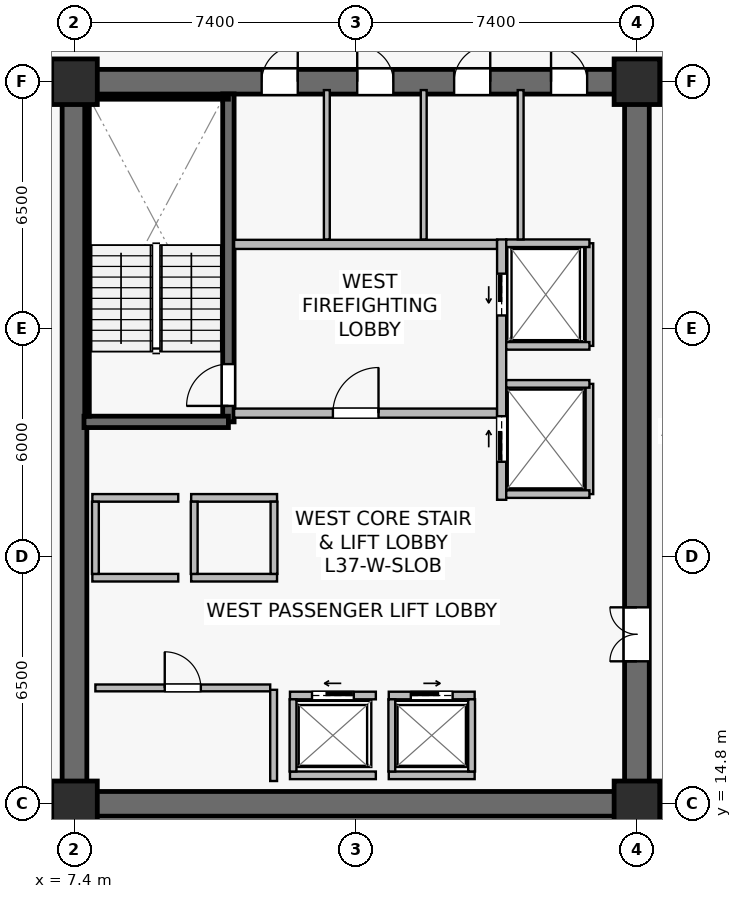
"""IFC4 building model, lengths in metres.
Left out: names, types, materials, properties, quantities, classifications, styles, units other than length and angle.
Written with IfcOpenShell. Run it as: python <this file> out.ifc"""

import sys

from ifc_helpers import new_model, si_unit, direction, frame, frame_2d, origin, origin_2d, place, context, subcontext, project, spatial, rectangle, extrude, source, transform, mapped, element, fill, save


model = new_model("IFC4")
c1 = context("Model", 3, precision=1e-05, world=origin(), true_north=direction((0.0, 1.0)))
c2 = subcontext(c1, "Body", "Model", "MODEL_VIEW")
j1 = project(units=[si_unit("LENGTHUNIT", "METRE"), si_unit("PLANEANGLEUNIT", "RADIAN")], contexts=[c1])
p1 = place(None, origin())
s1 = spatial("IfcSite", under=j1, at=p1, CompositionType="ELEMENT")
p2 = place(p1, origin())
s2 = spatial("IfcBuilding", under=s1, at=p2, CompositionType="ELEMENT")
p3 = place(p2, frame((0.0, 0.0, 154.3)))
s3 = spatial("IfcBuildingStorey", under=s2, at=p3, CompositionType="ELEMENT", Elevation=154.3)
p4 = place(p3, frame((7.075, 14.8, 0.0), z_axis=(0.0, 0.0, 1.0), x_axis=(1.0, 0.0, 0.0)))
e1 = element("IfcWall", 1, at=p4, inside=s3, PredefinedType="SHEAR", context=c2, shape_type="SweptSolid", body=[
    extrude(rectangle(XDim=15.45, YDim=0.65, at=frame_2d((7.725, 0.0))), origin(), (0.0, 0.0, 1.0), 3.79),
])
p5 = place(p3, frame((7.075, 33.8, 0.0), z_axis=(0.0, 0.0, 1.0), x_axis=(1.0, 0.0, 0.0)))
e2 = element("IfcWall", 2, at=p5, inside=s3, PredefinedType="SHEAR", context=c2, shape_type="SweptSolid", body=[
    extrude(rectangle(XDim=15.45, YDim=0.65, at=frame_2d((7.725, 0.0))), origin(), (0.0, 0.0, 1.0), 3.79),
])
p6 = place(p5, frame((5.25, 0.0, 0.0)))
e3 = element("IfcOpeningElement", 3, at=p6, cuts=e2, PredefinedType="OPENING", context=c2, shape_type="SweptSolid", body=[
    extrude(rectangle(XDim=0.95, YDim=2.15, at=frame_2d((0.475, 1.075))), frame((0.0, 0.335, 0.0), z_axis=(0.0, -1.0, 0.0), x_axis=(1.0, 0.0, 0.0)), (0.0, 0.0, 1.0), 0.67),
])
p7 = place(p5, frame((7.765, 0.0, 0.0)))
e4 = element("IfcOpeningElement", 4, at=p7, cuts=e2, PredefinedType="OPENING", context=c2, shape_type="SweptSolid", body=[
    extrude(rectangle(XDim=0.95, YDim=2.15, at=frame_2d((0.475, 1.075))), frame((0.0, 0.335, 0.0), z_axis=(0.0, -1.0, 0.0), x_axis=(1.0, 0.0, 0.0)), (0.0, 0.0, 1.0), 0.67),
])
p8 = place(p5, frame((10.315, 0.0, 0.0)))
e5 = element("IfcOpeningElement", 5, at=p8, cuts=e2, PredefinedType="OPENING", context=c2, shape_type="SweptSolid", body=[
    extrude(rectangle(XDim=0.95, YDim=2.15, at=frame_2d((0.475, 1.075))), frame((0.0, 0.335, 0.0), z_axis=(0.0, -1.0, 0.0), x_axis=(1.0, 0.0, 0.0)), (0.0, 0.0, 1.0), 0.67),
])
p9 = place(p5, frame((12.865, 0.0, 0.0)))
e6 = element("IfcOpeningElement", 6, at=p9, cuts=e2, PredefinedType="OPENING", context=c2, shape_type="SweptSolid", body=[
    extrude(rectangle(XDim=0.95, YDim=2.15, at=frame_2d((0.475, 1.075))), frame((0.0, 0.335, 0.0), z_axis=(0.0, -1.0, 0.0), x_axis=(1.0, 0.0, 0.0)), (0.0, 0.0, 1.0), 0.67),
])
p10 = place(p3, frame((7.4, 15.125, 0.0), z_axis=(0.0, 0.0, 1.0), x_axis=(0.0, 1.0, 0.0)))
e7 = element("IfcWall", 7, at=p10, inside=s3, PredefinedType="SHEAR", context=c2, shape_type="SweptSolid", body=[
    extrude(rectangle(XDim=18.35, YDim=0.65, at=frame_2d((9.175, 0.0))), origin(), (0.0, 0.0, 1.0), 3.79),
])
p11 = place(p3, frame((22.2, 15.125, 0.0), z_axis=(0.0, 0.0, 1.0), x_axis=(0.0, 1.0, 0.0)))
e8 = element("IfcWall", 8, at=p11, inside=s3, PredefinedType="SHEAR", context=c2, shape_type="SweptSolid", body=[
    extrude(rectangle(XDim=18.35, YDim=0.65, at=frame_2d((9.175, 0.0))), origin(), (0.0, 0.0, 1.0), 3.79),
])
p12 = place(p11, frame((3.425, 0.0, 0.0)))
e9 = element("IfcOpeningElement", 9, at=p12, cuts=e8, PredefinedType="OPENING", context=c2, shape_type="SweptSolid", body=[
    extrude(rectangle(XDim=1.42, YDim=2.2, at=frame_2d((0.71, 1.1))), frame((0.0, 0.335, 0.0), z_axis=(0.0, -1.0, 0.0), x_axis=(1.0, 0.0, 0.0)), (0.0, 0.0, 1.0), 0.67),
])
p13 = place(p3, frame((11.45, 24.85, 0.0), z_axis=(0.0, 0.0, 1.0), x_axis=(0.0, 1.0, 0.0)))
e10 = element("IfcWall", 10, at=p13, inside=s3, PredefinedType="SHEAR", context=c2, shape_type="SweptSolid", body=[
    extrude(rectangle(XDim=8.63, YDim=0.3, at=frame_2d((4.315, 0.0))), origin(), (0.0, 0.0, 1.0), 3.79),
])
p14 = place(p13, frame((0.42, 0.0, 0.0)))
e11 = element("IfcOpeningElement", 11, at=p14, cuts=e10, PredefinedType="OPENING", context=c2, shape_type="SweptSolid", body=[
    extrude(rectangle(XDim=1.1, YDim=2.15, at=frame_2d((0.55, 1.075))), frame((0.0, 0.16, 0.0), z_axis=(0.0, -1.0, 0.0), x_axis=(1.0, 0.0, 0.0)), (0.0, 0.0, 1.0), 0.32),
])
p15 = place(p3, frame((7.65, 24.85, 0.0), z_axis=(0.0, 0.0, 1.0), x_axis=(1.0, 0.0, 0.0)))
e12 = element("IfcWall", 12, at=p15, inside=s3, PredefinedType="SHEAR", context=c2, shape_type="SweptSolid", body=[
    extrude(rectangle(XDim=3.8, YDim=0.3, at=frame_2d((1.9, 0.0))), origin(), (0.0, 0.0, 1.0), 3.79),
])
p16 = place(p3, frame((7.73, 33.4, 0.0), z_axis=(0.0, 0.0, 1.0), x_axis=(1.0, 0.0, 0.0)))
e13 = element("IfcWall", 13, at=p16, inside=s3, PredefinedType="SOLIDWALL", context=c2, shape_type="SweptSolid", body=[
    extrude(rectangle(XDim=3.72, YDim=0.12, at=frame_2d((1.86, 0.0))), origin(), (0.0, 0.0, 1.0), 3.79),
])
p17 = place(p3, frame((7.73, 25.0, 0.0), z_axis=(0.0, 0.0, 1.0), x_axis=(0.0, 1.0, 0.0)))
e14 = element("IfcWall", 14, at=p17, inside=s3, PredefinedType="SOLIDWALL", context=c2, shape_type="SweptSolid", body=[
    extrude(rectangle(XDim=8.32, YDim=0.12, at=frame_2d((4.16, 0.0))), origin(), (0.0, 0.0, 1.0), 3.79),
])
m1 = source(origin(), c2, "Body", "SweptSolid", [
    extrude(rectangle(XDim=1.2, YDim=1.2, at=origin_2d()), origin(), (0.0, 0.0, 1.0), 4.1),
])
for number, where, z_axis, x_axis in (
    (15, (7.4, 14.8, 0.0), (0.0, 0.0, 1.0), (1.0, 0.0, 0.0)),
    (16, (22.2, 14.8, 0.0), (0.0, 0.0, 1.0), (1.0, 0.0, 0.0)),
    (17, (7.4, 33.8, 0.0), (0.0, 0.0, 1.0), (1.0, 0.0, 0.0)),
    (18, (22.2, 33.8, 0.0), (0.0, 0.0, 1.0), (1.0, 0.0, 0.0)),
):
    element("IfcColumn", number, at=place(p3, frame(where, z_axis=z_axis, x_axis=x_axis)), inside=s3, PredefinedType="COLUMN", context=c2, shape_type="MappedRepresentation", body=[
        mapped(m1, transform((0.0, 0.0, 0.0), scale=1.0)),
    ])
p18 = place(p3, frame((11.6, 25.08, 0.0), z_axis=(0.0, 0.0, 1.0), x_axis=(1.0, 0.0, 0.0)))
e19 = element("IfcWall", 19, at=p18, inside=s3, PredefinedType="SOLIDWALL", context=c2, shape_type="SweptSolid", body=[
    extrude(rectangle(XDim=6.92, YDim=0.24, at=frame_2d((3.46, 0.0))), origin(), (0.0, 0.0, 1.0), 3.187),
])
p19 = place(p18, frame((2.6, 0.0, 0.0)))
e20 = element("IfcOpeningElement", 20, at=p19, cuts=e19, PredefinedType="OPENING", context=c2, shape_type="SweptSolid", body=[
    extrude(rectangle(XDim=1.2, YDim=2.16, at=frame_2d((0.6, 1.08))), frame((0.0, 0.13, 0.0), z_axis=(0.0, -1.0, 0.0), x_axis=(1.0, 0.0, 0.0)), (0.0, 0.0, 1.0), 0.26),
])
p20 = place(p3, frame((11.6, 29.52, 0.0), z_axis=(0.0, 0.0, 1.0), x_axis=(1.0, 0.0, 0.0)))
e21 = element("IfcWall", 21, at=p20, inside=s3, PredefinedType="SOLIDWALL", context=c2, shape_type="SweptSolid", body=[
    extrude(rectangle(XDim=6.92, YDim=0.24, at=frame_2d((3.46, 0.0))), origin(), (0.0, 0.0, 1.0), 3.187),
])
p21 = place(p3, frame((18.64, 22.8, 0.0), z_axis=(0.0, 0.0, 1.0), x_axis=(0.0, 1.0, 0.0)))
e22 = element("IfcWall", 22, at=p21, inside=s3, PredefinedType="SOLIDWALL", context=c2, shape_type="SweptSolid", body=[
    extrude(rectangle(XDim=6.85, YDim=0.24, at=frame_2d((3.425, 0.0))), origin(), (0.0, 0.0, 1.0), 2.875),
])
p22 = place(p21, frame((4.85, 0.0, 0.0)))
e23 = element("IfcOpeningElement", 23, at=p22, cuts=e22, PredefinedType="OPENING", context=c2, shape_type="SweptSolid", body=[
    extrude(rectangle(XDim=1.1, YDim=2.22, at=frame_2d((0.55, 1.11))), frame((0.0, 0.13, 0.0), z_axis=(0.0, -1.0, 0.0), x_axis=(1.0, 0.0, 0.0)), (0.0, 0.0, 1.0), 0.26),
])
p23 = place(p21, frame((1.0, 0.0, 0.0)))
e24 = element("IfcOpeningElement", 24, at=p23, cuts=e22, PredefinedType="OPENING", context=c2, shape_type="SweptSolid", body=[
    extrude(rectangle(XDim=1.2, YDim=2.22, at=frame_2d((0.6, 1.11))), frame((0.0, 0.13, 0.0), z_axis=(0.0, -1.0, 0.0), x_axis=(1.0, 0.0, 0.0)), (0.0, 0.0, 1.0), 0.26),
])
p24 = place(p3, frame((13.07, 17.65, 0.0), z_axis=(0.0, 0.0, 1.0), x_axis=(1.0, 0.0, 0.0)))
e25 = element("IfcWall", 25, at=p24, inside=s3, PredefinedType="SOLIDWALL", context=c2, shape_type="SweptSolid", body=[
    extrude(rectangle(XDim=2.26, YDim=0.2, at=frame_2d((1.13, 0.0))), origin(), (0.0, 0.0, 1.0), 3.187),
])
p25 = place(p24, frame((0.58, 0.0, 0.0)))
e26 = element("IfcOpeningElement", 26, at=p25, cuts=e25, PredefinedType="OPENING", context=c2, shape_type="SweptSolid", body=[
    extrude(rectangle(XDim=1.1, YDim=2.22, at=frame_2d((0.55, 1.11))), frame((0.0, 0.11, 0.0), z_axis=(0.0, -1.0, 0.0), x_axis=(1.0, 0.0, 0.0)), (0.0, 0.0, 1.0), 0.22),
])
p26 = place(p3, frame((13.07, 15.55, 0.0), z_axis=(0.0, 0.0, 1.0), x_axis=(1.0, 0.0, 0.0)))
e27 = element("IfcWall", 27, at=p26, inside=s3, PredefinedType="SOLIDWALL", context=c2, shape_type="SweptSolid", body=[
    extrude(rectangle(XDim=2.26, YDim=0.2, at=frame_2d((1.13, 0.0))), origin(), (0.0, 0.0, 1.0), 3.187),
])
p27 = place(p3, frame((13.15, 15.65, 0.0), z_axis=(0.0, 0.0, 1.0), x_axis=(0.0, 1.0, 0.0)))
e28 = element("IfcWall", 28, at=p27, inside=s3, PredefinedType="SOLIDWALL", context=c2, shape_type="SweptSolid", body=[
    extrude(rectangle(XDim=1.9, YDim=0.18, at=frame_2d((0.95, 0.0))), origin(), (0.0, 0.0, 1.0), 3.79),
])
p28 = place(p3, frame((15.67, 17.65, 0.0), z_axis=(0.0, 0.0, 1.0), x_axis=(1.0, 0.0, 0.0)))
e29 = element("IfcWall", 29, at=p28, inside=s3, PredefinedType="SOLIDWALL", context=c2, shape_type="SweptSolid", body=[
    extrude(rectangle(XDim=2.26, YDim=0.2, at=frame_2d((1.13, 0.0))), origin(), (0.0, 0.0, 1.0), 3.79),
])
p29 = place(p28, frame((0.58, 0.0, 0.0)))
e30 = element("IfcOpeningElement", 30, at=p29, cuts=e29, PredefinedType="OPENING", context=c2, shape_type="SweptSolid", body=[
    extrude(rectangle(XDim=1.1, YDim=2.22, at=frame_2d((0.55, 1.11))), frame((0.0, 0.11, 0.0), z_axis=(0.0, -1.0, 0.0), x_axis=(1.0, 0.0, 0.0)), (0.0, 0.0, 1.0), 0.22),
])
p30 = place(p3, frame((15.67, 15.55, 0.0), z_axis=(0.0, 0.0, 1.0), x_axis=(1.0, 0.0, 0.0)))
e31 = element("IfcWall", 31, at=p30, inside=s3, PredefinedType="SOLIDWALL", context=c2, shape_type="SweptSolid", body=[
    extrude(rectangle(XDim=2.26, YDim=0.2, at=frame_2d((1.13, 0.0))), origin(), (0.0, 0.0, 1.0), 3.79),
])
for number, where, z_axis, x_axis in (
    (32, (15.75, 15.65, 0.0), (0.0, 0.0, 1.0), (0.0, 1.0, 0.0)),
    (33, (17.85, 15.65, 0.0), (0.0, 0.0, 1.0), (0.0, 1.0, 0.0)),
):
    element("IfcWall", number, at=place(p3, frame(where, z_axis=z_axis, x_axis=x_axis)), inside=s3, PredefinedType="SOLIDWALL", context=c2, shape_type="SweptSolid", body=[
        extrude(rectangle(XDim=1.9, YDim=0.18, at=frame_2d((0.95, 0.0))), origin(), (0.0, 0.0, 1.0), 3.79),
    ])
for number, where, z_axis, x_axis in (
    (34, (7.87, 20.75, 0.0), (0.0, 0.0, 1.0), (1.0, 0.0, 0.0)),
    (35, (7.87, 22.85, 0.0), (0.0, 0.0, 1.0), (1.0, 0.0, 0.0)),
):
    element("IfcWall", number, at=place(p3, frame(where, z_axis=z_axis, x_axis=x_axis)), inside=s3, PredefinedType="SOLIDWALL", context=c2, shape_type="SweptSolid", body=[
        extrude(rectangle(XDim=2.26, YDim=0.2, at=frame_2d((1.13, 0.0))), origin(), (0.0, 0.0, 1.0), 3.79),
    ])
p31 = place(p3, frame((7.95, 20.85, 0.0), z_axis=(0.0, 0.0, 1.0), x_axis=(0.0, 1.0, 0.0)))
e36 = element("IfcWall", 36, at=p31, inside=s3, PredefinedType="SOLIDWALL", context=c2, shape_type="SweptSolid", body=[
    extrude(rectangle(XDim=1.9, YDim=0.18, at=frame_2d((0.95, 0.0))), origin(), (0.0, 0.0, 1.0), 3.79),
])
for number, where, z_axis, x_axis in (
    (37, (10.47, 20.75, 0.0), (0.0, 0.0, 1.0), (1.0, 0.0, 0.0)),
    (38, (10.47, 22.85, 0.0), (0.0, 0.0, 1.0), (1.0, 0.0, 0.0)),
):
    element("IfcWall", number, at=place(p3, frame(where, z_axis=z_axis, x_axis=x_axis)), inside=s3, PredefinedType="SOLIDWALL", context=c2, shape_type="SweptSolid", body=[
        extrude(rectangle(XDim=2.26, YDim=0.2, at=frame_2d((1.13, 0.0))), origin(), (0.0, 0.0, 1.0), 3.79),
    ])
for number, where, z_axis, x_axis in (
    (39, (10.55, 20.85, 0.0), (0.0, 0.0, 1.0), (0.0, 1.0, 0.0)),
    (40, (12.65, 20.85, 0.0), (0.0, 0.0, 1.0), (0.0, 1.0, 0.0)),
):
    element("IfcWall", number, at=place(p3, frame(where, z_axis=z_axis, x_axis=x_axis)), inside=s3, PredefinedType="SOLIDWALL", context=c2, shape_type="SweptSolid", body=[
        extrude(rectangle(XDim=1.9, YDim=0.18, at=frame_2d((0.95, 0.0))), origin(), (0.0, 0.0, 1.0), 3.79),
    ])
p32 = place(p3, frame((20.95, 26.85, 0.0), z_axis=(0.0, 0.0, 1.0), x_axis=(0.0, 1.0, 0.0)))
e41 = element("IfcWall", 41, at=p32, inside=s3, PredefinedType="SOLIDWALL", context=c2, shape_type="SweptSolid", body=[
    extrude(rectangle(XDim=2.7, YDim=0.2, at=frame_2d((1.35, 0.0))), origin(), (0.0, 0.0, 1.0), 3.79),
])
p33 = place(p3, frame((18.76, 29.55, 0.0), z_axis=(0.0, 0.0, 1.0), x_axis=(1.0, 0.0, 0.0)))
e42 = element("IfcWall", 42, at=p33, inside=s3, PredefinedType="SOLIDWALL", context=c2, shape_type="SweptSolid", body=[
    extrude(rectangle(XDim=2.19, YDim=0.2, at=frame_2d((1.095, 0.0))), origin(), (0.0, 0.0, 1.0), 3.79),
])
p34 = place(p3, frame((18.76, 26.85, 0.0), z_axis=(0.0, 0.0, 1.0), x_axis=(1.0, 0.0, 0.0)))
e43 = element("IfcWall", 43, at=p34, inside=s3, PredefinedType="SOLIDWALL", context=c2, shape_type="SweptSolid", body=[
    extrude(rectangle(XDim=2.19, YDim=0.2, at=frame_2d((1.095, 0.0))), origin(), (0.0, 0.0, 1.0), 3.187),
])
p35 = place(p3, frame((20.95, 22.95, 0.0), z_axis=(0.0, 0.0, 1.0), x_axis=(0.0, 1.0, 0.0)))
e44 = element("IfcWall", 44, at=p35, inside=s3, PredefinedType="SOLIDWALL", context=c2, shape_type="SweptSolid", body=[
    extrude(rectangle(XDim=2.9, YDim=0.2, at=frame_2d((1.45, 0.0))), origin(), (0.0, 0.0, 1.0), 2.875),
])
for number, where, z_axis, x_axis in (
    (45, (18.76, 25.85, 0.0), (0.0, 0.0, 1.0), (1.0, 0.0, 0.0)),
    (46, (18.76, 22.95, 0.0), (0.0, 0.0, 1.0), (1.0, 0.0, 0.0)),
):
    element("IfcWall", number, at=place(p3, frame(where, z_axis=z_axis, x_axis=x_axis)), inside=s3, PredefinedType="SOLIDWALL", context=c2, shape_type="SweptSolid", body=[
        extrude(rectangle(XDim=2.19, YDim=0.2, at=frame_2d((1.095, 0.0))), origin(), (0.0, 0.0, 1.0), 3.79),
    ])
p36 = place(p3, frame((7.95, 17.85, 0.0), z_axis=(0.0, 0.0, 1.0), x_axis=(1.0, 0.0, 0.0)))
e47 = element("IfcWall", 47, at=p36, inside=s3, PredefinedType="SOLIDWALL", context=c2, shape_type="SweptSolid", body=[
    extrude(rectangle(XDim=4.6, YDim=0.18, at=frame_2d((2.3, 0.0))), origin(), (0.0, 0.0, 1.0), 3.79),
])
p37 = place(p36, frame((1.825, 0.0, 0.0)))
e48 = element("IfcOpeningElement", 48, at=p37, cuts=e47, PredefinedType="OPENING", context=c2, shape_type="SweptSolid", body=[
    extrude(rectangle(XDim=0.95, YDim=2.15, at=frame_2d((0.475, 1.075))), frame((0.0, 0.1, 0.0), z_axis=(0.0, -1.0, 0.0), x_axis=(1.0, 0.0, 0.0)), (0.0, 0.0, 1.0), 0.2),
])
p38 = place(p3, frame((12.64, 15.4, 0.0), z_axis=(0.0, 0.0, 1.0), x_axis=(0.0, 1.0, 0.0)))
e49 = element("IfcWall", 49, at=p38, inside=s3, PredefinedType="SOLIDWALL", context=c2, shape_type="SweptSolid", body=[
    extrude(rectangle(XDim=2.4, YDim=0.18, at=frame_2d((1.2, 0.0))), origin(), (0.0, 0.0, 1.0), 3.79),
])
for number, where, z_axis, x_axis in (
    (50, (14.04, 29.65, 0.0), (0.0, 0.0, 1.0), (0.0, 1.0, 0.0)),
    (51, (16.59, 29.65, 0.0), (0.0, 0.0, 1.0), (0.0, 1.0, 0.0)),
    (52, (19.14, 29.65, 0.0), (0.0, 0.0, 1.0), (0.0, 1.0, 0.0)),
):
    element("IfcWall", number, at=place(p3, frame(where, z_axis=z_axis, x_axis=x_axis)), inside=s3, PredefinedType="PLUMBINGWALL", context=c2, shape_type="SweptSolid", body=[
        extrude(rectangle(XDim=3.93, YDim=0.155, at=frame_2d((1.965, 0.0))), origin(), (0.0, 0.0, 1.0), 3.79),
    ])
m2 = source(origin(), c2, "Body", "SweptSolid", [
    extrude(rectangle(XDim=1.1, YDim=2.15, at=frame_2d((0.55, 1.075))), frame((0.0, 0.025, 0.0), z_axis=(0.0, -1.0, 0.0), x_axis=(1.0, 0.0, 0.0)), (0.0, 0.0, 1.0), 0.05),
])
p39 = place(p14, origin())
e53 = element("IfcDoor", 53, at=p39, inside=s3, OperationType="SINGLE_SWING_LEFT", PredefinedType="DOOR", context=c2, shape_type="MappedRepresentation", body=[
    mapped(m2, transform((0.0, 0.0, 0.0), scale=1.0)),
])
fill(e11, e53)
m3 = source(origin(), c2, "Body", "SweptSolid", [
    extrude(rectangle(XDim=1.2, YDim=2.16, at=frame_2d((0.6, 1.08))), frame((0.0, 0.025, 0.0), z_axis=(0.0, -1.0, 0.0), x_axis=(1.0, 0.0, 0.0)), (0.0, 0.0, 1.0), 0.05),
])
p40 = place(p19, origin())
e54 = element("IfcDoor", 54, at=p40, inside=s3, OperationType="SINGLE_SWING_RIGHT", PredefinedType="DOOR", context=c2, shape_type="MappedRepresentation", body=[
    mapped(m3, transform((0.0, 0.0, 0.0), scale=1.0)),
])
fill(e20, e54)
m4 = source(origin(), c2, "Body", "SweptSolid", [
    extrude(rectangle(XDim=1.1, YDim=2.22, at=frame_2d((0.55, 1.11))), frame((0.0, 0.025, 0.0), z_axis=(0.0, -1.0, 0.0), x_axis=(1.0, 0.0, 0.0)), (0.0, 0.0, 1.0), 0.05),
])
p41 = place(p25, origin())
e55 = element("IfcDoor", 55, at=p41, inside=s3, OperationType="SLIDING_TO_LEFT", PredefinedType="USERDEFINED", context=c2, shape_type="MappedRepresentation", body=[
    mapped(m4, transform((0.0, 0.0, 0.0), scale=1.0)),
])
fill(e26, e55)
p42 = place(p29, origin())
e56 = element("IfcDoor", 56, at=p42, inside=s3, OperationType="SLIDING_TO_RIGHT", PredefinedType="USERDEFINED", context=c2, shape_type="MappedRepresentation", body=[
    mapped(m4, transform((0.0, 0.0, 0.0), scale=1.0)),
])
fill(e30, e56)
p43 = place(p22, origin())
e57 = element("IfcDoor", 57, at=p43, inside=s3, OperationType="SLIDING_TO_LEFT", PredefinedType="USERDEFINED", context=c2, shape_type="MappedRepresentation", body=[
    mapped(m4, transform((0.0, 0.0, 0.0), scale=1.0)),
])
fill(e23, e57)
m5 = source(origin(), c2, "Body", "SweptSolid", [
    extrude(rectangle(XDim=1.2, YDim=2.22, at=frame_2d((0.6, 1.11))), frame((0.0, 0.025, 0.0), z_axis=(0.0, -1.0, 0.0), x_axis=(1.0, 0.0, 0.0)), (0.0, 0.0, 1.0), 0.05),
])
p44 = place(p23, origin())
e58 = element("IfcDoor", 58, at=p44, inside=s3, OperationType="SLIDING_TO_RIGHT", PredefinedType="USERDEFINED", context=c2, shape_type="MappedRepresentation", body=[
    mapped(m5, transform((0.0, 0.0, 0.0), scale=1.0)),
])
fill(e24, e58)
m6 = source(origin(), c2, "Body", "SweptSolid", [
    extrude(rectangle(XDim=0.95, YDim=2.15, at=frame_2d((0.475, 1.075))), frame((0.0, 0.025, 0.0), z_axis=(0.0, -1.0, 0.0), x_axis=(1.0, 0.0, 0.0)), (0.0, 0.0, 1.0), 0.05),
])
p45 = place(p37, origin())
e59 = element("IfcDoor", 59, at=p45, inside=s3, OperationType="SINGLE_SWING_LEFT", PredefinedType="DOOR", context=c2, shape_type="MappedRepresentation", body=[
    mapped(m6, transform((0.0, 0.0, 0.0), scale=1.0)),
])
fill(e48, e59)
m7 = source(origin(), c2, "Body", "SweptSolid", [
    extrude(rectangle(XDim=1.42, YDim=2.2, at=frame_2d((0.71, 1.1))), frame((0.0, 0.025, 0.0), z_axis=(0.0, -1.0, 0.0), x_axis=(1.0, 0.0, 0.0)), (0.0, 0.0, 1.0), 0.05),
])
p46 = place(p12, origin())
e60 = element("IfcDoor", 60, at=p46, inside=s3, OperationType="DOUBLE_DOOR_SINGLE_SWING", PredefinedType="DOOR", context=c2, shape_type="MappedRepresentation", body=[
    mapped(m7, transform((0.0, 0.0, 0.0), scale=1.0)),
])
fill(e9, e60)
p47 = place(p6, origin())
e61 = element("IfcDoor", 61, at=p47, inside=s3, OperationType="SINGLE_SWING_RIGHT", PredefinedType="DOOR", context=c2, shape_type="MappedRepresentation", body=[
    mapped(m6, transform((0.0, 0.0, 0.0), scale=1.0)),
])
fill(e3, e61)
p48 = place(p7, origin())
e62 = element("IfcDoor", 62, at=p48, inside=s3, OperationType="SINGLE_SWING_LEFT", PredefinedType="DOOR", context=c2, shape_type="MappedRepresentation", body=[
    mapped(m6, transform((0.0, 0.0, 0.0), scale=1.0)),
])
fill(e4, e62)
p49 = place(p8, origin())
e63 = element("IfcDoor", 63, at=p49, inside=s3, OperationType="SINGLE_SWING_RIGHT", PredefinedType="DOOR", context=c2, shape_type="MappedRepresentation", body=[
    mapped(m6, transform((0.0, 0.0, 0.0), scale=1.0)),
])
fill(e5, e63)
p50 = place(p9, origin())
e64 = element("IfcDoor", 64, at=p50, inside=s3, OperationType="SINGLE_SWING_LEFT", PredefinedType="DOOR", context=c2, shape_type="MappedRepresentation", body=[
    mapped(m6, transform((0.0, 0.0, 0.0), scale=1.0)),
])
fill(e6, e64)
save(model, sys.argv[1])
